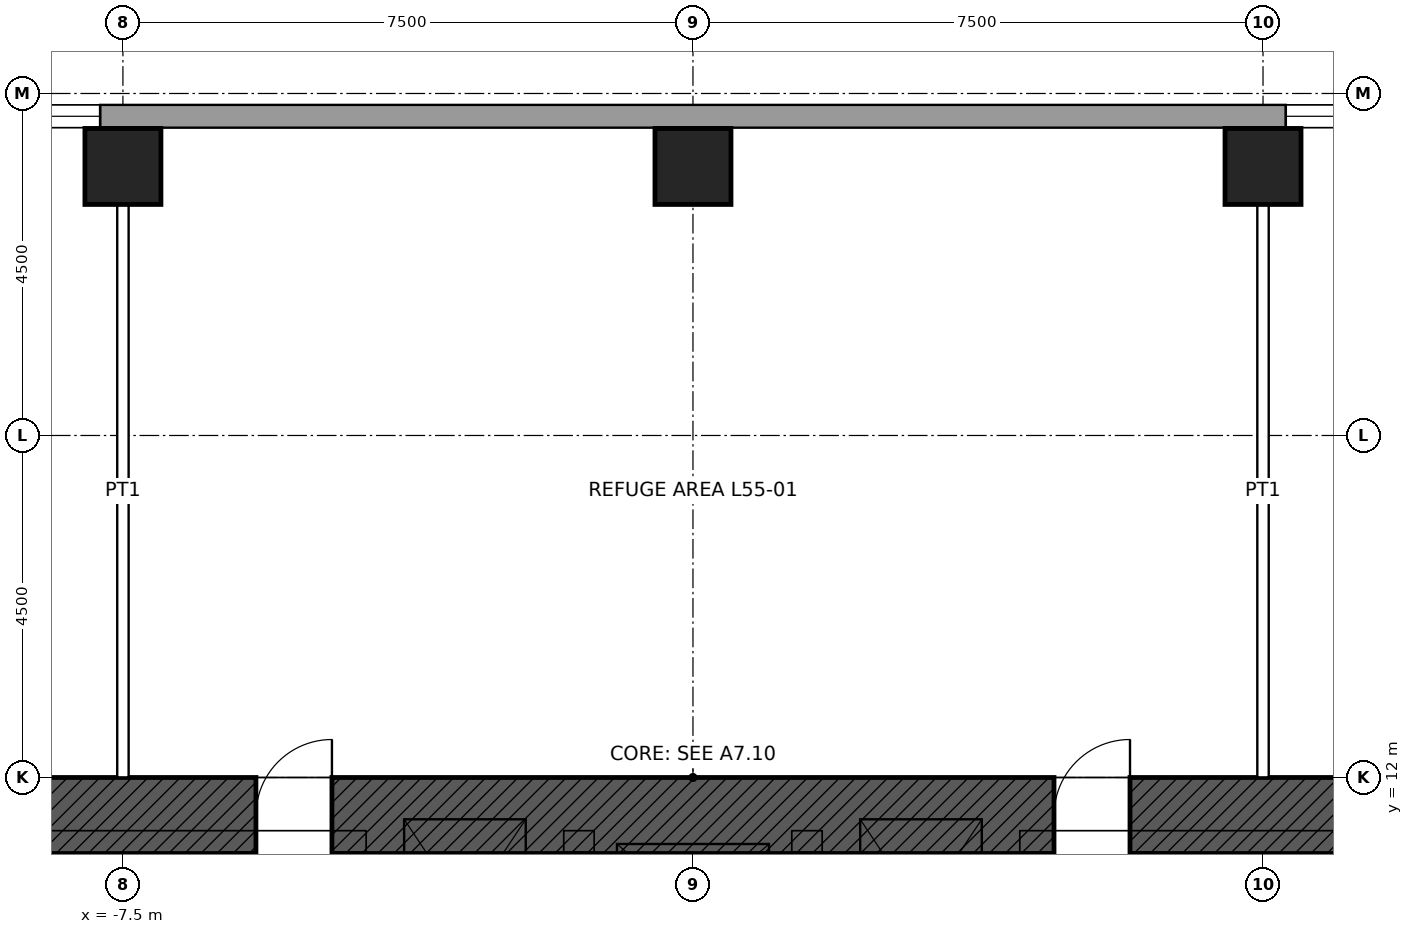
"""IFC4 building model, lengths in metres.
Left out: names, types, materials, properties, quantities, classifications, styles, units other than length and angle.
Written with IfcOpenShell. Run it as: python <this file> out.ifc"""

import sys

from ifc_helpers import new_model, si_unit, direction, frame, frame_2d, origin, origin_2d, place, context, subcontext, project, spatial, rectangle, hollow_rectangle, extrude, element, fill, save


model = new_model("IFC4")
c1 = context("Model", 3, precision=1e-05, world=origin(), true_north=direction((0.0, 1.0)))
c2 = subcontext(c1, "Body", "Model", "MODEL_VIEW")
j1 = project(units=[si_unit("LENGTHUNIT", "METRE"), si_unit("PLANEANGLEUNIT", "RADIAN")], contexts=[c1])
p1 = place(None, origin())
s1 = spatial("IfcSite", under=j1, at=p1, CompositionType="ELEMENT")
p2 = place(p1, origin())
s2 = spatial("IfcBuilding", under=s1, at=p2, CompositionType="ELEMENT")
p3 = place(p2, frame((0.0, 0.0, 253.9)))
s3 = spatial("IfcBuildingStorey", under=s2, at=p3, CompositionType="ELEMENT", Elevation=253.9)
p4 = place(p3, frame((-12.0, 11.5, 0.0), z_axis=(0.0, 0.0, 1.0), x_axis=(1.0, 0.0, 0.0)))
e1 = element("IfcWall", 1, at=p4, inside=s3, PredefinedType="SHEAR", context=c2, shape_type="SweptSolid", body=[
    extrude(rectangle(XDim=24.0, YDim=1.0, at=frame_2d((12.0, 0.0))), origin(), (0.0, 0.0, 1.0), 6.0),
])
p5 = place(p4, frame((6.25, 0.0, 0.0)))
e2 = element("IfcOpeningElement", 2, at=p5, cuts=e1, PredefinedType="OPENING", context=c2, shape_type="SweptSolid", body=[
    extrude(rectangle(XDim=1.0, YDim=2.4, at=frame_2d((0.5, 1.2))), frame((0.0, 0.51, 0.0), z_axis=(0.0, -1.0, 0.0), x_axis=(1.0, 0.0, 0.0)), (0.0, 0.0, 1.0), 1.02),
])
p6 = place(p4, frame((16.75, 0.0, 0.0)))
e3 = element("IfcOpeningElement", 3, at=p6, cuts=e1, PredefinedType="OPENING", context=c2, shape_type="SweptSolid", body=[
    extrude(rectangle(XDim=1.0, YDim=2.4, at=frame_2d((0.5, 1.2))), frame((0.0, 0.51, 0.0), z_axis=(0.0, -1.0, 0.0), x_axis=(1.0, 0.0, 0.0)), (0.0, 0.0, 1.0), 1.02),
])
for number, where, z_axis, x_axis in (
    (4, (-7.5, 20.04, -0.25), (0.0, 0.0, 1.0), (1.0, 0.0, 0.0)),
    (5, (0.0, 20.04, -0.25), (0.0, 0.0, 1.0), (1.0, 0.0, 0.0)),
    (6, (7.5, 20.04, -0.25), (0.0, 0.0, 1.0), (1.0, 0.0, 0.0)),
):
    element("IfcColumn", number, at=place(p3, frame(where, z_axis=z_axis, x_axis=x_axis)), inside=s3, PredefinedType="COLUMN", context=c2, shape_type="SweptSolid", body=[
        extrude(hollow_rectangle(XDim=1.0, YDim=1.0, WallThickness=0.075, at=origin_2d()), origin(), (0.0, 0.0, 1.0), 6.25),
    ])
p7 = place(p3, frame((-13.2, 20.7, 0.0), z_axis=(0.0, 0.0, 1.0), x_axis=(1.0, 0.0, 0.0)))
e7 = element("IfcWall", 7, at=p7, inside=s3, PredefinedType="SOLIDWALL", context=c2, shape_type="SweptSolid", body=[
    extrude(rectangle(XDim=26.4, YDim=0.3, at=frame_2d((13.2, 0.0))), origin(), (0.0, 0.0, 1.0), 5.85),
])
p8 = place(p7, frame((0.5, 0.0, 2.1)))
e8 = element("IfcOpeningElement", 8, at=p8, cuts=e7, PredefinedType="OPENING", context=c2, shape_type="SweptSolid", body=[
    extrude(rectangle(XDim=2.4, YDim=2.4, at=frame_2d((1.2, 1.2))), frame((0.0, 0.16, 0.0), z_axis=(0.0, -1.0, 0.0), x_axis=(1.0, 0.0, 0.0)), (0.0, 0.0, 1.0), 0.32),
])
p9 = place(p7, frame((3.0, 0.0, 2.1)))
e9 = element("IfcOpeningElement", 9, at=p9, cuts=e7, PredefinedType="OPENING", context=c2, shape_type="SweptSolid", body=[
    extrude(rectangle(XDim=2.4, YDim=2.4, at=frame_2d((1.2, 1.2))), frame((0.0, 0.16, 0.0), z_axis=(0.0, -1.0, 0.0), x_axis=(1.0, 0.0, 0.0)), (0.0, 0.0, 1.0), 0.32),
])
p10 = place(p7, frame((21.0, 0.0, 2.1)))
e10 = element("IfcOpeningElement", 10, at=p10, cuts=e7, PredefinedType="OPENING", context=c2, shape_type="SweptSolid", body=[
    extrude(rectangle(XDim=2.4, YDim=2.4, at=frame_2d((1.2, 1.2))), frame((0.0, 0.16, 0.0), z_axis=(0.0, -1.0, 0.0), x_axis=(1.0, 0.0, 0.0)), (0.0, 0.0, 1.0), 0.32),
])
for number, where, z_axis, x_axis in (
    (11, (-7.5, 12.0, 0.0), (0.0, 0.0, 1.0), (0.0, 1.0, 0.0)),
    (12, (7.5, 12.0, 0.0), (0.0, 0.0, 1.0), (0.0, 1.0, 0.0)),
):
    element("IfcWall", number, at=place(p3, frame(where, z_axis=z_axis, x_axis=x_axis)), inside=s3, PredefinedType="PARTITIONING", context=c2, shape_type="SweptSolid", body=[
        extrude(rectangle(XDim=7.54, YDim=0.15, at=frame_2d((3.77, 0.0))), origin(), (0.0, 0.0, 1.0), 5.85),
    ])
p11 = place(p9, origin())
e13 = element("IfcWindow", 13, at=p11, inside=s3, PartitioningType="SINGLE_PANEL", PredefinedType="WINDOW", context=c2, shape_type="SweptSolid", body=[
    extrude(rectangle(XDim=2.4, YDim=2.4, at=frame_2d((1.2, 1.2))), frame((0.0, 0.15, 0.0), z_axis=(0.0, -1.0, 0.0), x_axis=(1.0, 0.0, 0.0)), (0.0, 0.0, 1.0), 0.06),
])
fill(e9, e13)
p12 = place(p10, origin())
e14 = element("IfcWindow", 14, at=p12, inside=s3, PartitioningType="SINGLE_PANEL", PredefinedType="WINDOW", context=c2, shape_type="SweptSolid", body=[
    extrude(rectangle(XDim=2.4, YDim=2.4, at=frame_2d((1.2, 1.2))), frame((0.0, 0.15, 0.0), z_axis=(0.0, -1.0, 0.0), x_axis=(1.0, 0.0, 0.0)), (0.0, 0.0, 1.0), 0.06),
])
fill(e10, e14)
p13 = place(p5, origin())
e15 = element("IfcDoor", 15, at=p13, inside=s3, OperationType="SINGLE_SWING_RIGHT", PredefinedType="DOOR", context=c2, shape_type="SweptSolid", body=[
    extrude(rectangle(XDim=1.0, YDim=2.4, at=frame_2d((0.5, 1.2))), frame((0.0, 0.485, 0.0), z_axis=(0.0, -1.0, 0.0), x_axis=(1.0, 0.0, 0.0)), (0.0, 0.0, 1.0), 0.05),
])
fill(e2, e15)
p14 = place(p6, origin())
e16 = element("IfcDoor", 16, at=p14, inside=s3, OperationType="SINGLE_SWING_RIGHT", PredefinedType="DOOR", context=c2, shape_type="SweptSolid", body=[
    extrude(rectangle(XDim=1.0, YDim=2.4, at=frame_2d((0.5, 1.2))), frame((0.0, 0.485, 0.0), z_axis=(0.0, -1.0, 0.0), x_axis=(1.0, 0.0, 0.0)), (0.0, 0.0, 1.0), 0.05),
])
fill(e3, e16)
save(model, sys.argv[1])
